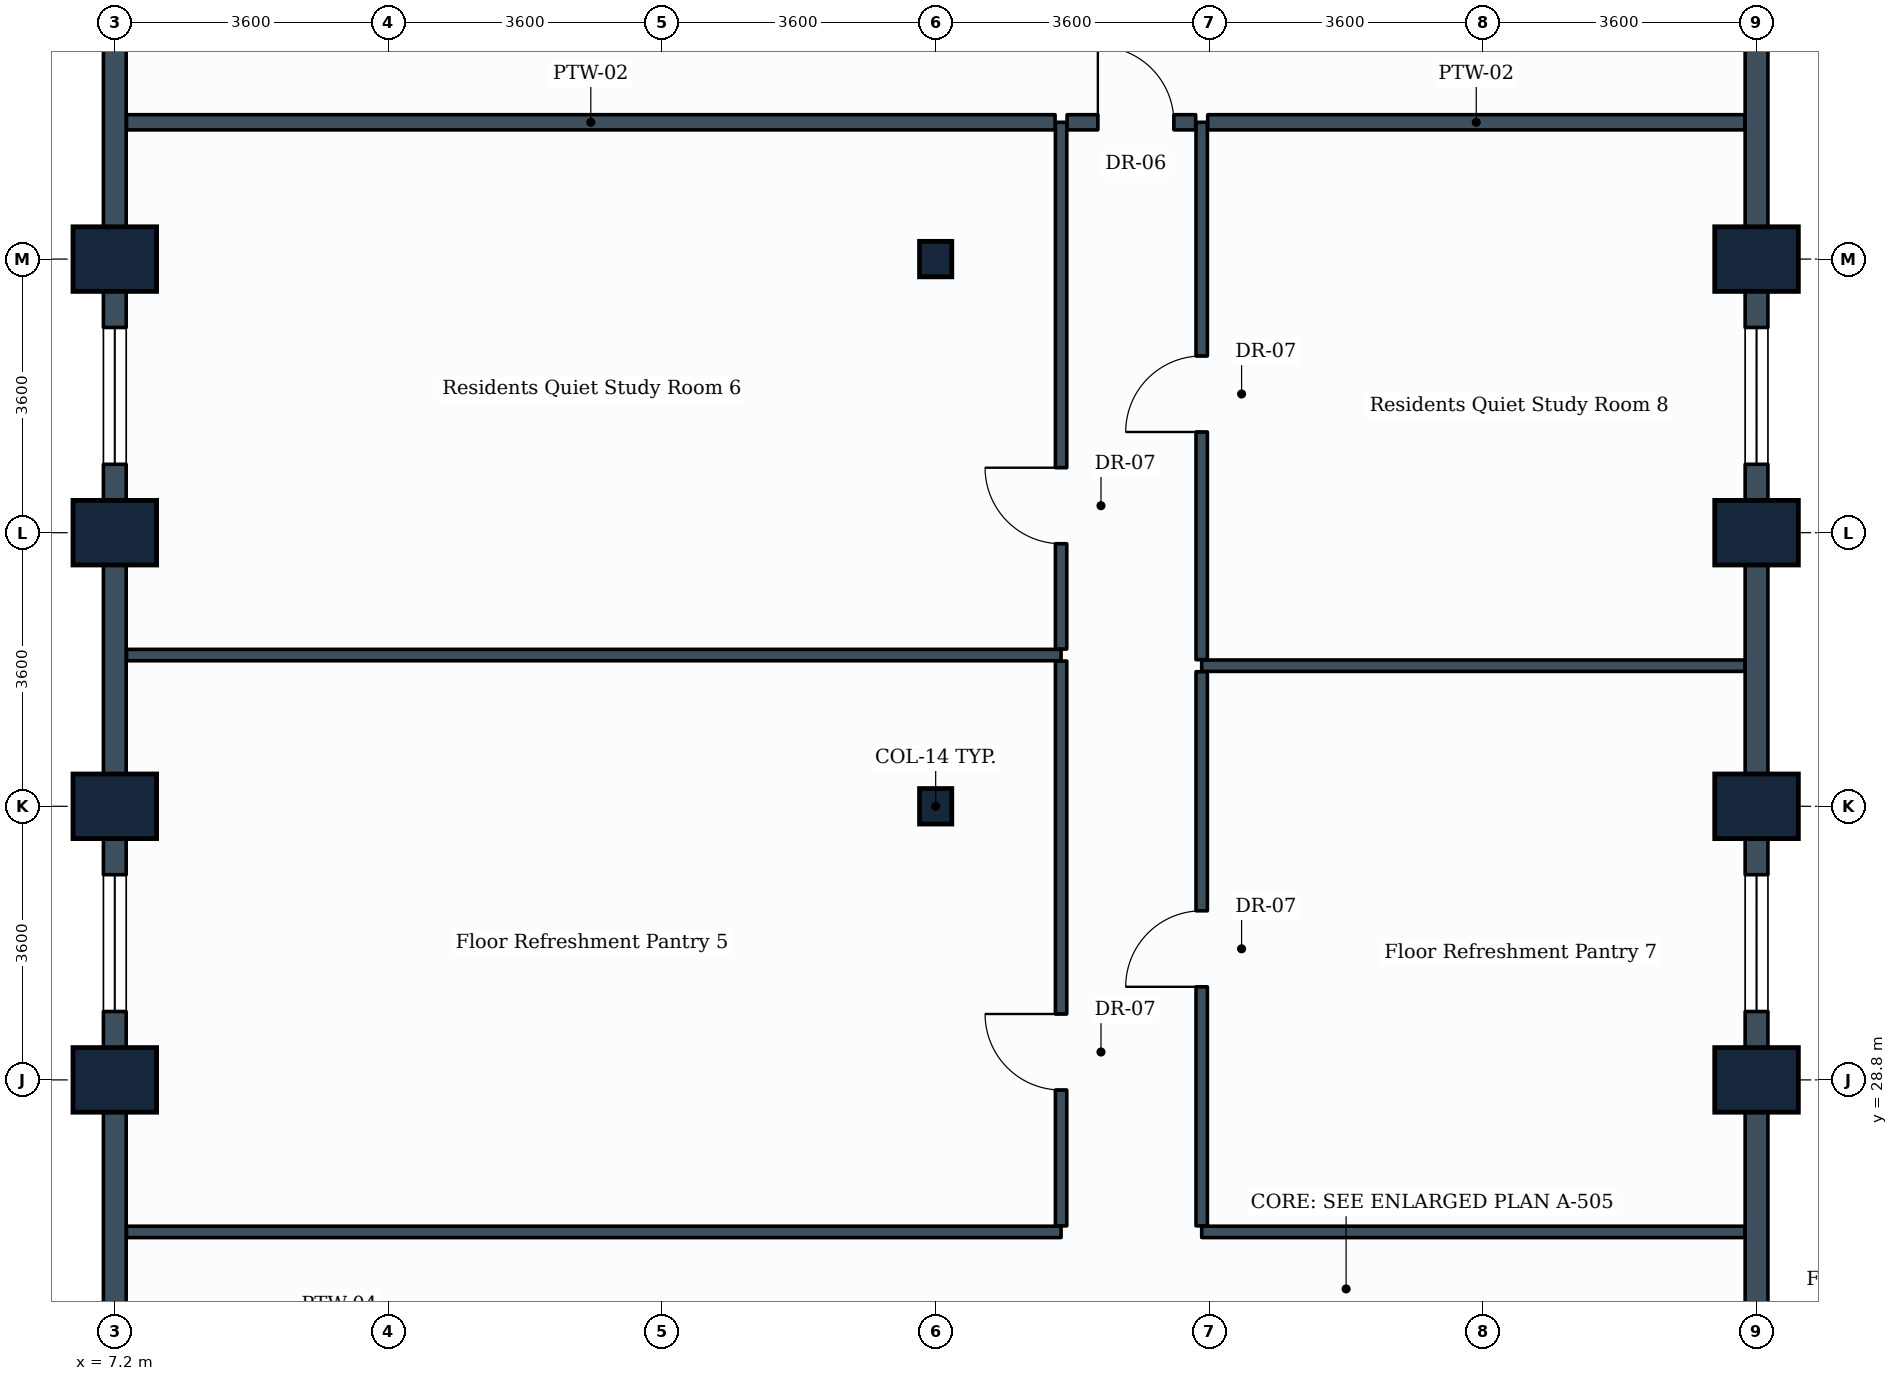
"""IFC4 building model, lengths in metres.
Left out: names, types, materials, properties, quantities, classifications, styles, units other than length and angle.
Written with IfcOpenShell. Run it as: python <this file> out.ifc"""

import sys

from ifc_helpers import new_model, si_unit, direction, frame, frame_2d, origin, origin_2d, place, context, subcontext, project, spatial, rectangle, i_section, extrude, element, fill, save


model = new_model("IFC4")
c1 = context("Model", 3, precision=1e-05, world=origin(), true_north=direction((0.0, 1.0)))
c2 = subcontext(c1, "Body", "Model", "MODEL_VIEW")
j1 = project(units=[si_unit("LENGTHUNIT", "METRE"), si_unit("PLANEANGLEUNIT", "RADIAN")], contexts=[c1])
p1 = place(None, origin())
s1 = spatial("IfcSite", under=j1, at=p1, CompositionType="ELEMENT")
p2 = place(p1, origin())
s2 = spatial("IfcBuilding", under=s1, at=p2, CompositionType="ELEMENT")
p3 = place(p2, frame((0.0, 0.0, 103.5)))
s3 = spatial("IfcBuildingStorey", under=s2, at=p3, CompositionType="ELEMENT", Elevation=103.5)
for number, where, z_axis, x_axis in (
    (1, (7.2, 28.8, 0.0), (0.0, 0.0, 1.0), (0.0, 1.0, 0.0)),
    (2, (7.2, 32.4, 0.0), (0.0, 0.0, 1.0), (0.0, 1.0, 0.0)),
    (3, (7.2, 36.0, 0.0), (0.0, 0.0, 1.0), (0.0, 1.0, 0.0)),
    (4, (7.2, 39.6, 0.0), (0.0, 0.0, 1.0), (0.0, 1.0, 0.0)),
):
    element("IfcColumn", number, at=place(p3, frame(where, z_axis=z_axis, x_axis=x_axis)), inside=s3, PredefinedType="COLUMN", context=c2, shape_type="SweptSolid", body=[
        extrude(rectangle(XDim=0.85, YDim=1.1, at=origin_2d()), origin(), (0.0, 0.0, 1.0), 3.9),
    ])
for number, where, z_axis, x_axis in (
    (5, (18.0, 32.4, 0.0), (0.0, 0.0, 1.0), (1.0, 0.0, 0.0)),
    (6, (18.0, 39.6, 0.0), (0.0, 0.0, 1.0), (1.0, 0.0, 0.0)),
):
    element("IfcColumn", number, at=place(p3, frame(where, z_axis=z_axis, x_axis=x_axis)), inside=s3, PredefinedType="COLUMN", context=c2, shape_type="SweptSolid", body=[
        extrude(i_section(OverallWidth=0.424, OverallDepth=0.467, WebThickness=0.033, FlangeThickness=0.053, FilletRadius=0.015, at=origin_2d()), origin(), (0.0, 0.0, 1.0), 3.9),
    ])
for number, where, z_axis, x_axis in (
    (7, (28.8, 28.8, 0.0), (0.0, 0.0, 1.0), (0.0, 1.0, 0.0)),
    (8, (28.8, 32.4, 0.0), (0.0, 0.0, 1.0), (0.0, 1.0, 0.0)),
    (9, (28.8, 36.0, 0.0), (0.0, 0.0, 1.0), (0.0, 1.0, 0.0)),
    (10, (28.8, 39.6, 0.0), (0.0, 0.0, 1.0), (0.0, 1.0, 0.0)),
):
    element("IfcColumn", number, at=place(p3, frame(where, z_axis=z_axis, x_axis=x_axis)), inside=s3, PredefinedType="COLUMN", context=c2, shape_type="SweptSolid", body=[
        extrude(rectangle(XDim=0.85, YDim=1.1, at=origin_2d()), origin(), (0.0, 0.0, 1.0), 3.9),
    ])
p4 = place(p3, frame((28.8, 28.8, 0.0), z_axis=(0.0, 0.0, 1.0), x_axis=(0.0, -1.0, 0.0)))
e11 = element("IfcWall", 11, at=p4, inside=s3, PredefinedType="STANDARD", context=c2, shape_type="SweptSolid", body=[
    extrude(rectangle(XDim=3.6, YDim=0.3, at=frame_2d((1.8, 0.0))), origin(), (0.0, 0.0, 1.0), 3.19),
])
p5 = place(p3, frame((28.8, 32.4, 0.0), z_axis=(0.0, 0.0, 1.0), x_axis=(0.0, -1.0, 0.0)))
e12 = element("IfcWall", 12, at=p5, inside=s3, PredefinedType="STANDARD", context=c2, shape_type="SweptSolid", body=[
    extrude(rectangle(XDim=3.6, YDim=0.3, at=frame_2d((1.8, 0.0))), origin(), (0.0, 0.0, 1.0), 2.93),
])
p6 = place(p5, frame((0.9, 0.0, 0.85)))
e13 = element("IfcOpeningElement", 13, at=p6, cuts=e12, PredefinedType="OPENING", context=c2, shape_type="SweptSolid", body=[
    extrude(rectangle(XDim=1.8, YDim=1.35, at=frame_2d((0.9, 0.675))), frame((0.0, 0.16, 0.0), z_axis=(0.0, -1.0, 0.0), x_axis=(1.0, 0.0, 0.0)), (0.0, 0.0, 1.0), 0.32),
])
p7 = place(p3, frame((28.8, 36.0, 0.0), z_axis=(0.0, 0.0, 1.0), x_axis=(0.0, -1.0, 0.0)))
e14 = element("IfcWall", 14, at=p7, inside=s3, PredefinedType="STANDARD", context=c2, shape_type="SweptSolid", body=[
    extrude(rectangle(XDim=3.6, YDim=0.3, at=frame_2d((1.8, 0.0))), origin(), (0.0, 0.0, 1.0), 2.93),
])
p8 = place(p3, frame((28.8, 39.6, 0.0), z_axis=(0.0, 0.0, 1.0), x_axis=(0.0, -1.0, 0.0)))
e15 = element("IfcWall", 15, at=p8, inside=s3, PredefinedType="STANDARD", context=c2, shape_type="SweptSolid", body=[
    extrude(rectangle(XDim=3.6, YDim=0.3, at=frame_2d((1.8, 0.0))), origin(), (0.0, 0.0, 1.0), 2.93),
])
p9 = place(p8, frame((0.9, 0.0, 0.85)))
e16 = element("IfcOpeningElement", 16, at=p9, cuts=e15, PredefinedType="OPENING", context=c2, shape_type="SweptSolid", body=[
    extrude(rectangle(XDim=1.8, YDim=1.35, at=frame_2d((0.9, 0.675))), frame((0.0, 0.16, 0.0), z_axis=(0.0, -1.0, 0.0), x_axis=(1.0, 0.0, 0.0)), (0.0, 0.0, 1.0), 0.32),
])
for number, where, z_axis, x_axis in (
    (17, (28.8, 43.2, 0.0), (0.0, 0.0, 1.0), (0.0, -1.0, 0.0)),
    (18, (7.2, 39.6, 0.0), (0.0, 0.0, 1.0), (0.0, 1.0, 0.0)),
):
    element("IfcWall", number, at=place(p3, frame(where, z_axis=z_axis, x_axis=x_axis)), inside=s3, PredefinedType="STANDARD", context=c2, shape_type="SweptSolid", body=[
        extrude(rectangle(XDim=3.6, YDim=0.3, at=frame_2d((1.8, 0.0))), origin(), (0.0, 0.0, 1.0), 2.93),
    ])
p10 = place(p3, frame((7.2, 36.0, 0.0), z_axis=(0.0, 0.0, 1.0), x_axis=(0.0, 1.0, 0.0)))
e19 = element("IfcWall", 19, at=p10, inside=s3, PredefinedType="STANDARD", context=c2, shape_type="SweptSolid", body=[
    extrude(rectangle(XDim=3.6, YDim=0.3, at=frame_2d((1.8, 0.0))), origin(), (0.0, 0.0, 1.0), 2.93),
])
p11 = place(p10, frame((0.9, 0.0, 0.85)))
e20 = element("IfcOpeningElement", 20, at=p11, cuts=e19, PredefinedType="OPENING", context=c2, shape_type="SweptSolid", body=[
    extrude(rectangle(XDim=1.8, YDim=1.35, at=frame_2d((0.9, 0.675))), frame((0.0, 0.16, 0.0), z_axis=(0.0, -1.0, 0.0), x_axis=(1.0, 0.0, 0.0)), (0.0, 0.0, 1.0), 0.32),
])
p12 = place(p3, frame((7.2, 32.4, 0.0), z_axis=(0.0, 0.0, 1.0), x_axis=(0.0, 1.0, 0.0)))
e21 = element("IfcWall", 21, at=p12, inside=s3, PredefinedType="STANDARD", context=c2, shape_type="SweptSolid", body=[
    extrude(rectangle(XDim=3.6, YDim=0.3, at=frame_2d((1.8, 0.0))), origin(), (0.0, 0.0, 1.0), 2.93),
])
p13 = place(p3, frame((7.2, 28.8, 0.0), z_axis=(0.0, 0.0, 1.0), x_axis=(0.0, 1.0, 0.0)))
e22 = element("IfcWall", 22, at=p13, inside=s3, PredefinedType="STANDARD", context=c2, shape_type="SweptSolid", body=[
    extrude(rectangle(XDim=3.6, YDim=0.3, at=frame_2d((1.8, 0.0))), origin(), (0.0, 0.0, 1.0), 2.93),
])
p14 = place(p13, frame((0.9, 0.0, 0.85)))
e23 = element("IfcOpeningElement", 23, at=p14, cuts=e22, PredefinedType="OPENING", context=c2, shape_type="SweptSolid", body=[
    extrude(rectangle(XDim=1.8, YDim=1.35, at=frame_2d((0.9, 0.675))), frame((0.0, 0.16, 0.0), z_axis=(0.0, -1.0, 0.0), x_axis=(1.0, 0.0, 0.0)), (0.0, 0.0, 1.0), 0.32),
])
p15 = place(p3, frame((7.2, 25.2, 0.0), z_axis=(0.0, 0.0, 1.0), x_axis=(0.0, 1.0, 0.0)))
e24 = element("IfcWall", 24, at=p15, inside=s3, PredefinedType="STANDARD", context=c2, shape_type="SweptSolid", body=[
    extrude(rectangle(XDim=3.6, YDim=0.3, at=frame_2d((1.8, 0.0))), origin(), (0.0, 0.0, 1.0), 2.93),
])
for number, where, z_axis, x_axis in (
    (25, (7.354, 26.8, 0.0), (0.0, 0.0, 1.0), (1.0, 0.0, 0.0)),
    (26, (7.354, 34.39, 0.0), (0.0, 0.0, 1.0), (1.0, 0.0, 0.0)),
):
    element("IfcWall", number, at=place(p3, frame(where, z_axis=z_axis, x_axis=x_axis)), inside=s3, PredefinedType="PARTITIONING", context=c2, shape_type="SweptSolid", body=[
        extrude(rectangle(XDim=12.296, YDim=0.15, at=frame_2d((6.148, 0.0))), origin(), (0.0, 0.0, 1.0), 2.93),
    ])
p16 = place(p3, frame((19.65, 26.879, 0.0), z_axis=(0.0, 0.0, 1.0), x_axis=(0.0, 1.0, 0.0)))
e27 = element("IfcWall", 27, at=p16, inside=s3, PredefinedType="PARTITIONING", context=c2, shape_type="SweptSolid", body=[
    extrude(rectangle(XDim=7.432, YDim=0.15, at=frame_2d((3.716, 0.0))), origin(), (0.0, 0.0, 1.0), 3.19),
])
p17 = place(p16, frame((1.788, 0.0, 0.0)))
e28 = element("IfcOpeningElement", 28, at=p17, cuts=e27, PredefinedType="OPENING", context=c2, shape_type="SweptSolid", body=[
    extrude(rectangle(XDim=1.0, YDim=2.1, at=frame_2d((0.5, 1.05))), frame((0.0, 0.085, 0.0), z_axis=(0.0, -1.0, 0.0), x_axis=(1.0, 0.0, 0.0)), (0.0, 0.0, 1.0), 0.17),
])
p18 = place(p3, frame((19.65, 34.469, 0.0), z_axis=(0.0, 0.0, 1.0), x_axis=(0.0, 1.0, 0.0)))
e29 = element("IfcWall", 29, at=p18, inside=s3, PredefinedType="PARTITIONING", context=c2, shape_type="SweptSolid", body=[
    extrude(rectangle(XDim=6.931, YDim=0.15, at=frame_2d((3.465, 0.0))), origin(), (0.0, 0.0, 1.0), 3.19),
])
p19 = place(p18, frame((1.386, 0.0, 0.0)))
e30 = element("IfcOpeningElement", 30, at=p19, cuts=e29, PredefinedType="OPENING", context=c2, shape_type="SweptSolid", body=[
    extrude(rectangle(XDim=1.0, YDim=2.1, at=frame_2d((0.5, 1.05))), frame((0.0, 0.085, 0.0), z_axis=(0.0, -1.0, 0.0), x_axis=(1.0, 0.0, 0.0)), (0.0, 0.0, 1.0), 0.17),
])
p20 = place(p3, frame((21.5, 26.8, 0.0), z_axis=(0.0, 0.0, 1.0), x_axis=(1.0, 0.0, 0.0)))
e31 = element("IfcWall", 31, at=p20, inside=s3, PredefinedType="PARTITIONING", context=c2, shape_type="SweptSolid", body=[
    extrude(rectangle(XDim=7.146, YDim=0.15, at=frame_2d((3.573, 0.0))), origin(), (0.0, 0.0, 1.0), 3.635),
])
p21 = place(p3, frame((21.5, 34.25, 0.0), z_axis=(0.0, 0.0, 1.0), x_axis=(1.0, 0.0, 0.0)))
e32 = element("IfcWall", 32, at=p21, inside=s3, PredefinedType="PARTITIONING", context=c2, shape_type="SweptSolid", body=[
    extrude(rectangle(XDim=7.146, YDim=0.15, at=frame_2d((3.573, 0.0))), origin(), (0.0, 0.0, 1.0), 2.93),
])
p22 = place(p3, frame((21.5, 26.879, 0.0), z_axis=(0.0, 0.0, 1.0), x_axis=(0.0, 1.0, 0.0)))
e33 = element("IfcWall", 33, at=p22, inside=s3, PredefinedType="PARTITIONING", context=c2, shape_type="SweptSolid", body=[
    extrude(rectangle(XDim=7.292, YDim=0.15, at=frame_2d((3.646, 0.0))), origin(), (0.0, 0.0, 1.0), 3.19),
])
p23 = place(p22, frame((3.146, 0.0, 0.0)))
e34 = element("IfcOpeningElement", 34, at=p23, cuts=e33, PredefinedType="OPENING", context=c2, shape_type="SweptSolid", body=[
    extrude(rectangle(XDim=1.0, YDim=2.1, at=frame_2d((0.5, 1.05))), frame((0.0, 0.085, 0.0), z_axis=(0.0, -1.0, 0.0), x_axis=(1.0, 0.0, 0.0)), (0.0, 0.0, 1.0), 0.17),
])
p24 = place(p3, frame((21.5, 34.329, 0.0), z_axis=(0.0, 0.0, 1.0), x_axis=(0.0, 1.0, 0.0)))
e35 = element("IfcWall", 35, at=p24, inside=s3, PredefinedType="PARTITIONING", context=c2, shape_type="SweptSolid", body=[
    extrude(rectangle(XDim=7.071, YDim=0.15, at=frame_2d((3.535, 0.0))), origin(), (0.0, 0.0, 1.0), 3.18),
])
p25 = place(p24, frame((2.996, 0.0, 0.0)))
e36 = element("IfcOpeningElement", 36, at=p25, cuts=e35, PredefinedType="OPENING", context=c2, shape_type="SweptSolid", body=[
    extrude(rectangle(XDim=1.0, YDim=2.1, at=frame_2d((0.5, 1.05))), frame((0.0, 0.085, 0.0), z_axis=(0.0, -1.0, 0.0), x_axis=(1.0, 0.0, 0.0)), (0.0, 0.0, 1.0), 0.17),
])
p26 = place(p3, frame((7.354, 41.4, 0.0), z_axis=(0.0, 0.0, 1.0), x_axis=(1.0, 0.0, 0.0)))
e37 = element("IfcWall", 37, at=p26, inside=s3, PredefinedType="PARTITIONING", context=c2, shape_type="SweptSolid", body=[
    extrude(rectangle(XDim=12.217, YDim=0.2, at=frame_2d((6.108, 0.0))), origin(), (0.0, 0.0, 1.0), 2.93),
])
p27 = place(p3, frame((21.579, 41.4, 0.0), z_axis=(0.0, 0.0, 1.0), x_axis=(1.0, 0.0, 0.0)))
e38 = element("IfcWall", 38, at=p27, inside=s3, PredefinedType="PARTITIONING", context=c2, shape_type="SweptSolid", body=[
    extrude(rectangle(XDim=7.067, YDim=0.2, at=frame_2d((3.533, 0.0))), origin(), (0.0, 0.0, 1.0), 2.93),
])
p28 = place(p3, frame((19.729, 41.4, 0.0), z_axis=(0.0, 0.0, 1.0), x_axis=(1.0, 0.0, 0.0)))
e39 = element("IfcWall", 39, at=p28, inside=s3, PredefinedType="PARTITIONING", context=c2, shape_type="SweptSolid", body=[
    extrude(rectangle(XDim=1.692, YDim=0.2, at=frame_2d((0.846, 0.0))), origin(), (0.0, 0.0, 1.0), 3.635),
])
p29 = place(p28, frame((0.405, 0.0, 0.0)))
e40 = element("IfcOpeningElement", 40, at=p29, cuts=e39, PredefinedType="OPENING", context=c2, shape_type="SweptSolid", body=[
    extrude(rectangle(XDim=1.0, YDim=2.1, at=frame_2d((0.5, 1.05))), frame((0.0, 0.11, 0.0), z_axis=(0.0, -1.0, 0.0), x_axis=(1.0, 0.0, 0.0)), (0.0, 0.0, 1.0), 0.22),
])
p30 = place(p6, origin())
e41 = element("IfcWindow", 41, at=p30, inside=s3, PartitioningType="SINGLE_PANEL", PredefinedType="WINDOW", context=c2, shape_type="SweptSolid", body=[
    extrude(rectangle(XDim=1.8, YDim=1.35, at=frame_2d((0.9, 0.675))), frame((0.0, 0.03, 0.0), z_axis=(0.0, -1.0, 0.0), x_axis=(1.0, 0.0, 0.0)), (0.0, 0.0, 1.0), 0.06),
])
fill(e13, e41)
p31 = place(p9, origin())
e42 = element("IfcWindow", 42, at=p31, inside=s3, PartitioningType="SINGLE_PANEL", PredefinedType="WINDOW", context=c2, shape_type="SweptSolid", body=[
    extrude(rectangle(XDim=1.8, YDim=1.35, at=frame_2d((0.9, 0.675))), frame((0.0, 0.03, 0.0), z_axis=(0.0, -1.0, 0.0), x_axis=(1.0, 0.0, 0.0)), (0.0, 0.0, 1.0), 0.06),
])
fill(e16, e42)
p32 = place(p11, origin())
e43 = element("IfcWindow", 43, at=p32, inside=s3, PartitioningType="SINGLE_PANEL", PredefinedType="WINDOW", context=c2, shape_type="SweptSolid", body=[
    extrude(rectangle(XDim=1.8, YDim=1.35, at=frame_2d((0.9, 0.675))), frame((0.0, 0.03, 0.0), z_axis=(0.0, -1.0, 0.0), x_axis=(1.0, 0.0, 0.0)), (0.0, 0.0, 1.0), 0.06),
])
fill(e20, e43)
p33 = place(p14, origin())
e44 = element("IfcWindow", 44, at=p33, inside=s3, PartitioningType="SINGLE_PANEL", PredefinedType="WINDOW", context=c2, shape_type="SweptSolid", body=[
    extrude(rectangle(XDim=1.8, YDim=1.35, at=frame_2d((0.9, 0.675))), frame((0.0, 0.03, 0.0), z_axis=(0.0, -1.0, 0.0), x_axis=(1.0, 0.0, 0.0)), (0.0, 0.0, 1.0), 0.06),
])
fill(e23, e44)
p34 = place(p17, origin())
e45 = element("IfcDoor", 45, at=p34, inside=s3, OperationType="SINGLE_SWING_RIGHT", PredefinedType="DOOR", context=c2, shape_type="SweptSolid", body=[
    extrude(rectangle(XDim=1.0, YDim=2.1, at=frame_2d((0.5, 1.05))), frame((0.0, 0.025, 0.0), z_axis=(0.0, -1.0, 0.0), x_axis=(1.0, 0.0, 0.0)), (0.0, 0.0, 1.0), 0.05),
])
fill(e28, e45)
p35 = place(p19, origin())
e46 = element("IfcDoor", 46, at=p35, inside=s3, OperationType="SINGLE_SWING_RIGHT", PredefinedType="DOOR", context=c2, shape_type="SweptSolid", body=[
    extrude(rectangle(XDim=1.0, YDim=2.1, at=frame_2d((0.5, 1.05))), frame((0.0, 0.025, 0.0), z_axis=(0.0, -1.0, 0.0), x_axis=(1.0, 0.0, 0.0)), (0.0, 0.0, 1.0), 0.05),
])
fill(e30, e46)
p36 = place(p23, origin())
e47 = element("IfcDoor", 47, at=p36, inside=s3, OperationType="SINGLE_SWING_LEFT", PredefinedType="DOOR", context=c2, shape_type="SweptSolid", body=[
    extrude(rectangle(XDim=1.0, YDim=2.1, at=frame_2d((0.5, 1.05))), frame((0.0, 0.025, 0.0), z_axis=(0.0, -1.0, 0.0), x_axis=(1.0, 0.0, 0.0)), (0.0, 0.0, 1.0), 0.05),
])
fill(e34, e47)
p37 = place(p25, origin())
e48 = element("IfcDoor", 48, at=p37, inside=s3, OperationType="SINGLE_SWING_LEFT", PredefinedType="DOOR", context=c2, shape_type="SweptSolid", body=[
    extrude(rectangle(XDim=1.0, YDim=2.1, at=frame_2d((0.5, 1.05))), frame((0.0, 0.025, 0.0), z_axis=(0.0, -1.0, 0.0), x_axis=(1.0, 0.0, 0.0)), (0.0, 0.0, 1.0), 0.05),
])
fill(e36, e48)
p38 = place(p29, origin())
e49 = element("IfcDoor", 49, at=p38, inside=s3, OperationType="SINGLE_SWING_LEFT", PredefinedType="DOOR", context=c2, shape_type="SweptSolid", body=[
    extrude(rectangle(XDim=1.0, YDim=2.1, at=frame_2d((0.5, 1.05))), frame((0.0, 0.025, 0.0), z_axis=(0.0, -1.0, 0.0), x_axis=(1.0, 0.0, 0.0)), (0.0, 0.0, 1.0), 0.05),
])
fill(e40, e49)
save(model, sys.argv[1])
